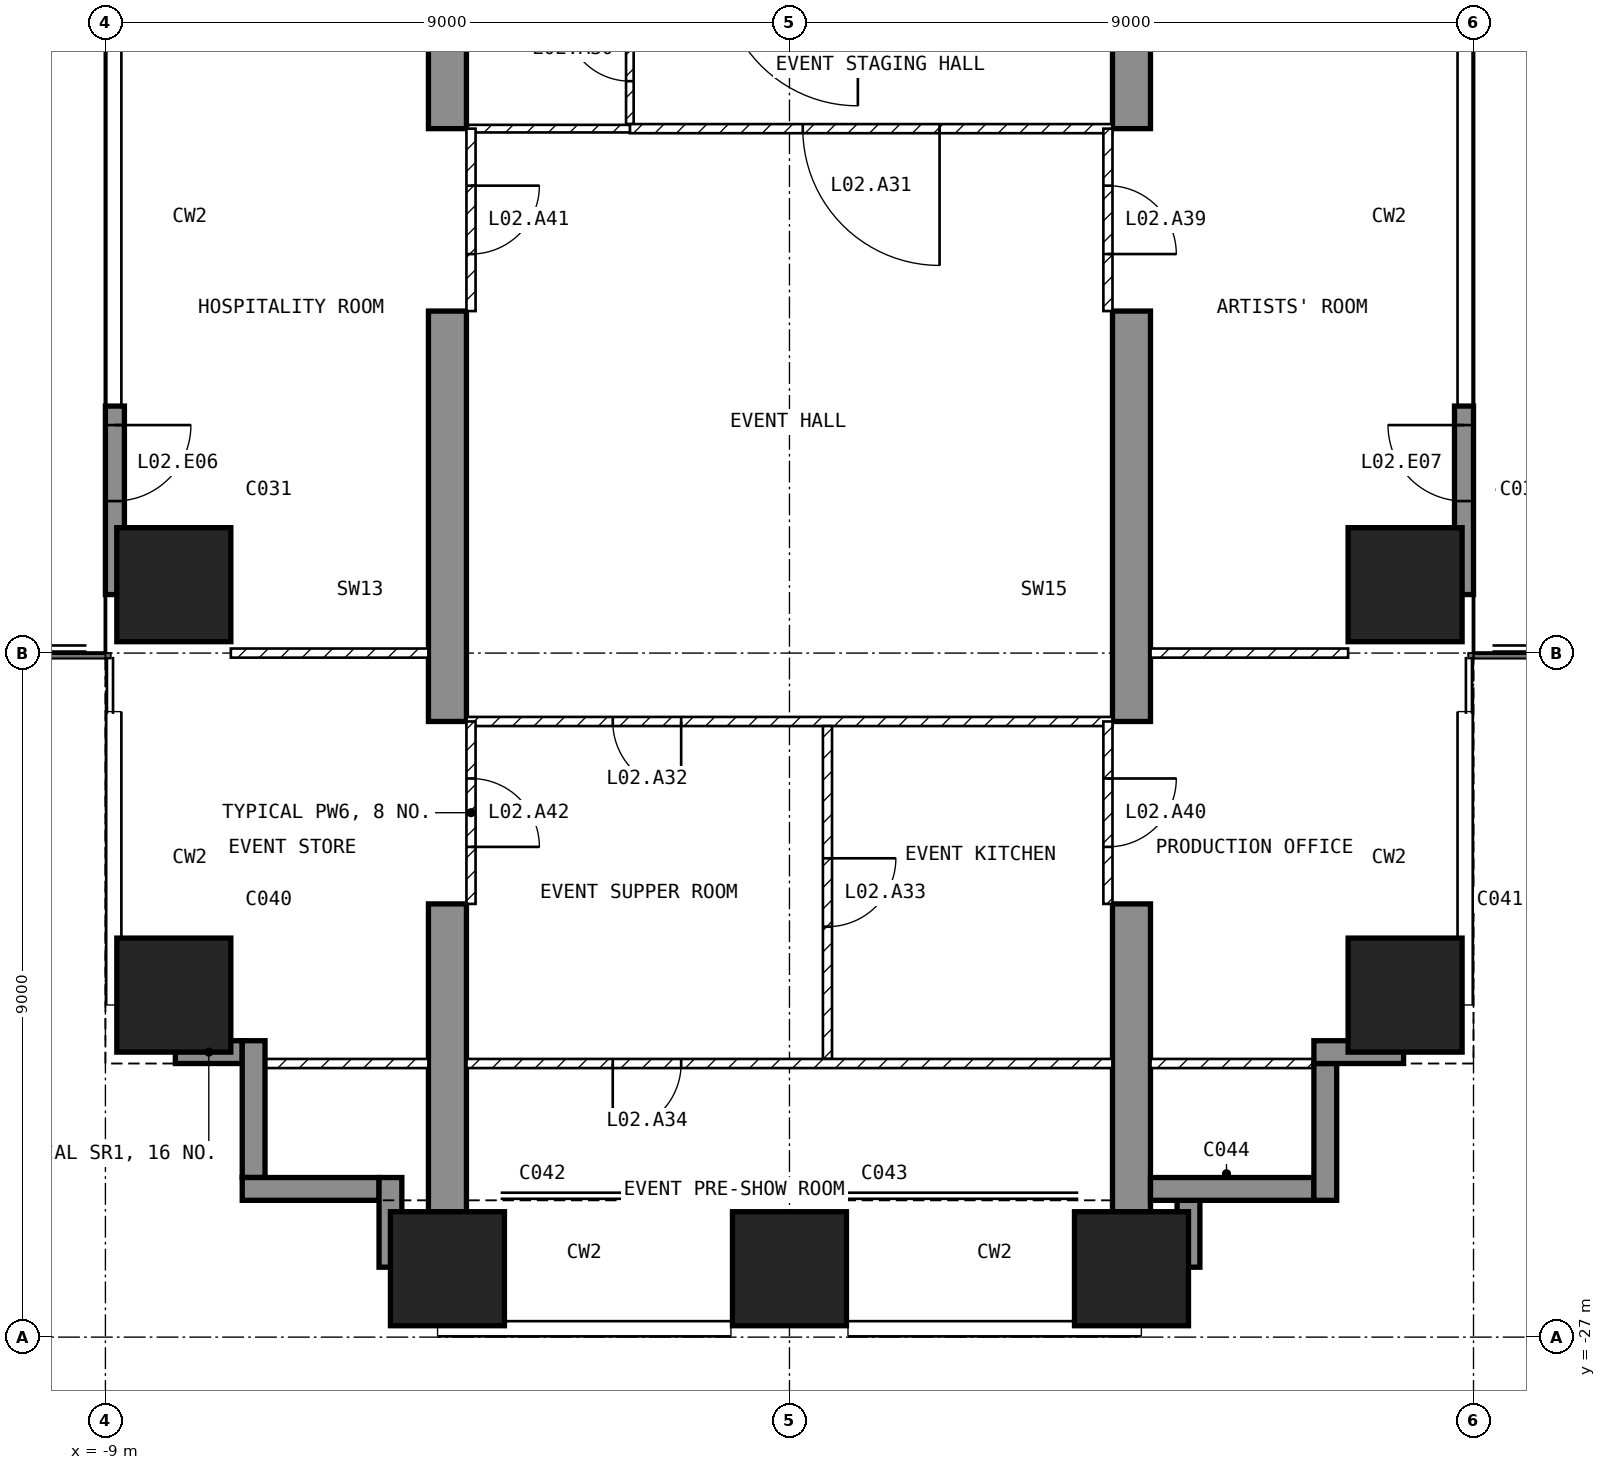
"""IFC4 building model, lengths in metres.
Left out: names, types, materials, properties, quantities, classifications, styles, units other than length and angle.
Written with IfcOpenShell. Run it as: python <this file> out.ifc"""

import sys

from ifc_helpers import new_model, si_unit, direction, frame, frame_2d, origin, origin_2d, place, context, subcontext, project, spatial, polyline, rectangle, outline, extrude, element, fill, save


model = new_model("IFC4")
c1 = context("Model", 3, precision=1e-05, world=origin(), true_north=direction((0.0, 1.0)))
c2 = subcontext(c1, "Body", "Model", "MODEL_VIEW")
j1 = project(units=[si_unit("LENGTHUNIT", "METRE"), si_unit("PLANEANGLEUNIT", "RADIAN")], contexts=[c1])
p1 = place(None, origin())
s1 = spatial("IfcSite", under=j1, at=p1, CompositionType="ELEMENT")
p2 = place(p1, origin())
s2 = spatial("IfcBuilding", under=s1, at=p2, CompositionType="ELEMENT")
p3 = place(p2, frame((0.0, 0.0, 21.0)))
s3 = spatial("IfcBuildingStorey", under=s2, at=p3, CompositionType="ELEMENT", Elevation=21.0)
for number, where, z_axis, x_axis in (
    (1, (-8.1, -22.5, -1.4), (0.0, 0.0, 1.0), (1.0, 0.0, 0.0)),
    (2, (-8.1, -17.1, -1.4), (0.0, 0.0, 1.0), (1.0, 0.0, 0.0)),
):
    element("IfcColumn", number, at=place(p3, frame(where, z_axis=z_axis, x_axis=x_axis)), inside=s3, PredefinedType="COLUMN", context=c2, shape_type="SweptSolid", body=[
        extrude(rectangle(XDim=1.5, YDim=1.5, at=origin_2d()), origin(), (0.0, 0.0, 1.0), 6.95),
    ])
for number, where, z_axis, x_axis in (
    (3, (-4.5, -26.1, -0.3), (0.0, 0.0, 1.0), (1.0, 0.0, 0.0)),
    (4, (0.0, -26.1, -0.3), (0.0, 0.0, 1.0), (1.0, 0.0, 0.0)),
    (5, (4.5, -26.1, -0.3), (0.0, 0.0, 1.0), (1.0, 0.0, 0.0)),
):
    element("IfcColumn", number, at=place(p3, frame(where, z_axis=z_axis, x_axis=x_axis)), inside=s3, PredefinedType="COLUMN", context=c2, shape_type="SweptSolid", body=[
        extrude(rectangle(XDim=1.5, YDim=1.5, at=origin_2d()), origin(), (0.0, 0.0, 1.0), 5.85),
    ])
for number, where, z_axis, x_axis in (
    (6, (8.1, -22.5, -1.4), (0.0, 0.0, 1.0), (1.0, 0.0, 0.0)),
    (7, (8.1, -17.1, -1.4), (0.0, 0.0, 1.0), (1.0, 0.0, 0.0)),
):
    element("IfcColumn", number, at=place(p3, frame(where, z_axis=z_axis, x_axis=x_axis)), inside=s3, PredefinedType="COLUMN", context=c2, shape_type="SweptSolid", body=[
        extrude(rectangle(XDim=1.5, YDim=1.5, at=origin_2d()), origin(), (0.0, 0.0, 1.0), 6.95),
    ])
for number, where, z_axis, x_axis in (
    (8, (-4.75, -25.35, -0.3), (1.0, 0.0, 0.0), (0.0, 1.0, 0.0)),
    (9, (4.25, -25.35, -0.3), (1.0, 0.0, 0.0), (0.0, 1.0, 0.0)),
):
    element("IfcWall", number, at=place(p3, frame(where, z_axis=z_axis, x_axis=x_axis)), inside=s3, PredefinedType="SHEAR", context=c2, shape_type="SweptSolid", body=[
        extrude(outline(polyline([(0.0, 0.0), (4.05, 0.0), (4.05, 2.7), (6.45, 2.7), (6.45, 0.0), (11.85, 0.0), (11.85, 2.7), (14.25, 2.7), (14.25, 0.0), (16.35, 0.0), (16.35, 5.85), (0.0, 5.85), (0.0, 0.0)])), origin(), (0.0, 0.0, 1.0), 0.5),
    ])
p4 = place(p3, frame((-8.875, -14.75, 0.0), z_axis=(0.0, 0.0, 1.0), x_axis=(0.0, -1.0, 0.0)))
e10 = element("IfcWall", 10, at=p4, inside=s3, PredefinedType="SOLIDWALL", context=c2, shape_type="SweptSolid", body=[
    extrude(rectangle(XDim=2.48, YDim=0.25, at=frame_2d((1.24, 0.0))), origin(), (0.0, 0.0, 1.0), 5.55),
])
p5 = place(p4, frame((0.25, 0.0, 0.0)))
e11 = element("IfcOpeningElement", 11, at=p5, cuts=e10, PredefinedType="OPENING", context=c2, shape_type="SweptSolid", body=[
    extrude(rectangle(XDim=1.0, YDim=2.4, at=frame_2d((0.5, 1.2))), frame((0.0, 0.135, 0.0), z_axis=(0.0, -1.0, 0.0), x_axis=(1.0, 0.0, 0.0)), (0.0, 0.0, 1.0), 0.27),
])
p6 = place(p3, frame((8.875, -17.23, 0.0), z_axis=(0.0, 0.0, 1.0), x_axis=(0.0, 1.0, 0.0)))
e12 = element("IfcWall", 12, at=p6, inside=s3, PredefinedType="SOLIDWALL", context=c2, shape_type="SweptSolid", body=[
    extrude(rectangle(XDim=2.48, YDim=0.25, at=frame_2d((1.24, 0.0))), origin(), (0.0, 0.0, 1.0), 5.55),
])
p7 = place(p6, frame((1.23, 0.0, 0.0)))
e13 = element("IfcOpeningElement", 13, at=p7, cuts=e12, PredefinedType="OPENING", context=c2, shape_type="SweptSolid", body=[
    extrude(rectangle(XDim=1.0, YDim=2.4, at=frame_2d((0.5, 1.2))), frame((0.0, 0.135, 0.0), z_axis=(0.0, -1.0, 0.0), x_axis=(1.0, 0.0, 0.0)), (0.0, 0.0, 1.0), 0.27),
])
p8 = place(p3, frame((5.25, -26.08, 0.0), z_axis=(0.0, 0.0, 1.0), x_axis=(0.0, 1.0, 0.0)))
e14 = element("IfcWall", 14, at=p8, inside=s3, PredefinedType="SOLIDWALL", context=c2, shape_type="SweptSolid", body=[
    extrude(rectangle(XDim=0.88, YDim=0.3, at=frame_2d((0.44, 0.0))), origin(), (0.0, 0.0, 1.0), 5.55),
])
p9 = place(p3, frame((4.75, -25.05, 0.0), z_axis=(0.0, 0.0, 1.0), x_axis=(1.0, 0.0, 0.0)))
e15 = element("IfcWall", 15, at=p9, inside=s3, PredefinedType="SOLIDWALL", context=c2, shape_type="SweptSolid", body=[
    extrude(rectangle(XDim=2.15, YDim=0.3, at=frame_2d((1.075, 0.0))), origin(), (0.0, 0.0, 1.0), 5.55),
])
p10 = place(p3, frame((7.05, -25.2, 0.0), z_axis=(0.0, 0.0, 1.0), x_axis=(0.0, 1.0, 0.0)))
e16 = element("IfcWall", 16, at=p10, inside=s3, PredefinedType="SOLIDWALL", context=c2, shape_type="SweptSolid", body=[
    extrude(rectangle(XDim=1.8, YDim=0.3, at=frame_2d((0.9, 0.0))), origin(), (0.0, 0.0, 1.0), 5.55),
])
p11 = place(p3, frame((6.9, -23.25, 0.0), z_axis=(0.0, 0.0, 1.0), x_axis=(1.0, 0.0, 0.0)))
e17 = element("IfcWall", 17, at=p11, inside=s3, PredefinedType="SOLIDWALL", context=c2, shape_type="SweptSolid", body=[
    extrude(rectangle(XDim=1.18, YDim=0.3, at=frame_2d((0.59, 0.0))), origin(), (0.0, 0.0, 1.0), 5.55),
])
p12 = place(p3, frame((-8.08, -23.25, 0.0), z_axis=(0.0, 0.0, 1.0), x_axis=(1.0, 0.0, 0.0)))
e18 = element("IfcWall", 18, at=p12, inside=s3, PredefinedType="SOLIDWALL", context=c2, shape_type="SweptSolid", body=[
    extrude(rectangle(XDim=0.88, YDim=0.3, at=frame_2d((0.44, 0.0))), origin(), (0.0, 0.0, 1.0), 5.55),
])
p13 = place(p3, frame((-7.05, -23.1, 0.0), z_axis=(0.0, 0.0, 1.0), x_axis=(0.0, -1.0, 0.0)))
e19 = element("IfcWall", 19, at=p13, inside=s3, PredefinedType="SOLIDWALL", context=c2, shape_type="SweptSolid", body=[
    extrude(rectangle(XDim=1.8, YDim=0.3, at=frame_2d((0.9, 0.0))), origin(), (0.0, 0.0, 1.0), 5.55),
])
p14 = place(p3, frame((-7.2, -25.05, 0.0), z_axis=(0.0, 0.0, 1.0), x_axis=(1.0, 0.0, 0.0)))
e20 = element("IfcWall", 20, at=p14, inside=s3, PredefinedType="SOLIDWALL", context=c2, shape_type="SweptSolid", body=[
    extrude(rectangle(XDim=1.8, YDim=0.3, at=frame_2d((0.9, 0.0))), origin(), (0.0, 0.0, 1.0), 5.55),
])
p15 = place(p3, frame((-5.25, -24.9, 0.0), z_axis=(0.0, 0.0, 1.0), x_axis=(0.0, -1.0, 0.0)))
e21 = element("IfcWall", 21, at=p15, inside=s3, PredefinedType="SOLIDWALL", context=c2, shape_type="SweptSolid", body=[
    extrude(rectangle(XDim=1.18, YDim=0.3, at=frame_2d((0.59, 0.0))), origin(), (0.0, 0.0, 1.0), 5.55),
])
p16 = place(p3, frame((-2.1, -11.04, 0.0), z_axis=(0.0, 0.0, 1.0), x_axis=(0.0, 1.0, 0.0)))
e22 = element("IfcWall", 22, at=p16, inside=s3, PredefinedType="PARTITIONING", context=c2, shape_type="SweptSolid", body=[
    extrude(rectangle(XDim=1.98, YDim=0.1, at=frame_2d((0.99, 0.0))), origin(), (0.0, 0.0, 1.0), 5.55),
])
p17 = place(p16, frame((0.565, 0.0, 0.0)))
e23 = element("IfcOpeningElement", 23, at=p17, cuts=e22, PredefinedType="OPENING", context=c2, shape_type="SweptSolid", body=[
    extrude(rectangle(XDim=0.85, YDim=2.1, at=frame_2d((0.425, 1.05))), frame((0.0, 0.06, 0.0), z_axis=(0.0, -1.0, 0.0), x_axis=(1.0, 0.0, 0.0)), (0.0, 0.0, 1.0), 0.12),
])
p18 = place(p3, frame((4.25, -11.1, 0.0), z_axis=(0.0, 0.0, 1.0), x_axis=(-1.0, 0.0, 0.0)))
e24 = element("IfcWall", 24, at=p18, inside=s3, PredefinedType="PARTITIONING", context=c2, shape_type="SweptSolid", body=[
    extrude(rectangle(XDim=6.35, YDim=0.12, at=frame_2d((3.175, 0.0))), origin(), (0.0, 0.0, 1.0), 5.55),
])
p19 = place(p18, frame((2.275, 0.0, 0.0)))
e25 = element("IfcOpeningElement", 25, at=p19, cuts=e24, PredefinedType="OPENING", context=c2, shape_type="SweptSolid", body=[
    extrude(rectangle(XDim=1.8, YDim=2.1, at=frame_2d((0.9, 1.05))), frame((0.0, 0.07, 0.0), z_axis=(0.0, -1.0, 0.0), x_axis=(1.0, 0.0, 0.0)), (0.0, 0.0, 1.0), 0.14),
])
p20 = place(p3, frame((-2.1, -11.1, 0.0), z_axis=(0.0, 0.0, 1.0), x_axis=(-1.0, 0.0, 0.0)))
e26 = element("IfcWall", 26, at=p20, inside=s3, PredefinedType="PARTITIONING", context=c2, shape_type="SweptSolid", body=[
    extrude(rectangle(XDim=2.15, YDim=0.1, at=frame_2d((1.075, 0.0))), origin(), (0.0, 0.0, 1.0), 5.55),
])
p21 = place(p3, frame((4.25, -18.9, 0.0), z_axis=(0.0, 0.0, 1.0), x_axis=(-1.0, 0.0, 0.0)))
e27 = element("IfcWall", 27, at=p21, inside=s3, PredefinedType="PARTITIONING", context=c2, shape_type="SweptSolid", body=[
    extrude(rectangle(XDim=8.5, YDim=0.12, at=frame_2d((4.25, 0.0))), origin(), (0.0, 0.0, 1.0), 5.55),
])
p22 = place(p21, frame((5.675, 0.0, 0.0)))
e28 = element("IfcOpeningElement", 28, at=p22, cuts=e27, PredefinedType="OPENING", context=c2, shape_type="SweptSolid", body=[
    extrude(rectangle(XDim=0.9, YDim=2.1, at=frame_2d((0.45, 1.05))), frame((0.0, 0.07, 0.0), z_axis=(0.0, -1.0, 0.0), x_axis=(1.0, 0.0, 0.0)), (0.0, 0.0, 1.0), 0.14),
])
p23 = place(p3, frame((0.5, -18.96, 0.0), z_axis=(0.0, 0.0, 1.0), x_axis=(0.0, -1.0, 0.0)))
e29 = element("IfcWall", 29, at=p23, inside=s3, PredefinedType="PARTITIONING", context=c2, shape_type="SweptSolid", body=[
    extrude(rectangle(XDim=4.38, YDim=0.12, at=frame_2d((2.19, 0.0))), origin(), (0.0, 0.0, 1.0), 5.55),
])
p24 = place(p23, frame((1.74, 0.0, 0.0)))
e30 = element("IfcOpeningElement", 30, at=p24, cuts=e29, PredefinedType="OPENING", context=c2, shape_type="SweptSolid", body=[
    extrude(rectangle(XDim=0.9, YDim=2.1, at=frame_2d((0.45, 1.05))), frame((0.0, 0.07, 0.0), z_axis=(0.0, -1.0, 0.0), x_axis=(1.0, 0.0, 0.0)), (0.0, 0.0, 1.0), 0.14),
])
p25 = place(p3, frame((4.25, -23.4, 0.0), z_axis=(0.0, 0.0, 1.0), x_axis=(-1.0, 0.0, 0.0)))
e31 = element("IfcWall", 31, at=p25, inside=s3, PredefinedType="PARTITIONING", context=c2, shape_type="SweptSolid", body=[
    extrude(rectangle(XDim=8.5, YDim=0.12, at=frame_2d((4.25, 0.0))), origin(), (0.0, 0.0, 1.0), 5.55),
])
p26 = place(p25, frame((5.675, 0.0, 0.0)))
e32 = element("IfcOpeningElement", 32, at=p26, cuts=e31, PredefinedType="OPENING", context=c2, shape_type="SweptSolid", body=[
    extrude(rectangle(XDim=0.9, YDim=2.1, at=frame_2d((0.45, 1.05))), frame((0.0, 0.07, 0.0), z_axis=(0.0, -1.0, 0.0), x_axis=(1.0, 0.0, 0.0)), (0.0, 0.0, 1.0), 0.14),
])
p27 = place(p3, frame((7.35, -18.0, 0.0), z_axis=(0.0, 0.0, 1.0), x_axis=(-1.0, 0.0, 0.0)))
e33 = element("IfcWall", 33, at=p27, inside=s3, PredefinedType="PARTITIONING", context=c2, shape_type="SweptSolid", body=[
    extrude(rectangle(XDim=2.6, YDim=0.12, at=frame_2d((1.3, 0.0))), origin(), (0.0, 0.0, 1.0), 5.55),
])
p28 = place(p3, frame((7.12, -23.4, 0.0), z_axis=(0.0, 0.0, 1.0), x_axis=(-1.0, 0.0, 0.0)))
e34 = element("IfcWall", 34, at=p28, inside=s3, PredefinedType="PARTITIONING", context=c2, shape_type="SweptSolid", body=[
    extrude(rectangle(XDim=2.37, YDim=0.12, at=frame_2d((1.185, 0.0))), origin(), (0.0, 0.0, 1.0), 5.55),
])
p29 = place(p3, frame((-4.75, -18.0, 0.0), z_axis=(0.0, 0.0, 1.0), x_axis=(-1.0, 0.0, 0.0)))
e35 = element("IfcWall", 35, at=p29, inside=s3, PredefinedType="PARTITIONING", context=c2, shape_type="SweptSolid", body=[
    extrude(rectangle(XDim=2.6, YDim=0.12, at=frame_2d((1.3, 0.0))), origin(), (0.0, 0.0, 1.0), 5.55),
])
p30 = place(p3, frame((-4.75, -23.4, 0.0), z_axis=(0.0, 0.0, 1.0), x_axis=(-1.0, 0.0, 0.0)))
e36 = element("IfcWall", 36, at=p30, inside=s3, PredefinedType="PARTITIONING", context=c2, shape_type="SweptSolid", body=[
    extrude(rectangle(XDim=2.37, YDim=0.12, at=frame_2d((1.185, 0.0))), origin(), (0.0, 0.0, 1.0), 5.55),
])
p31 = place(p3, frame((4.19, -11.1, 0.0), z_axis=(0.0, 0.0, 1.0), x_axis=(0.0, -1.0, 0.0)))
e37 = element("IfcWall", 37, at=p31, inside=s3, PredefinedType="PARTITIONING", context=c2, shape_type="SweptSolid", body=[
    extrude(rectangle(XDim=2.4, YDim=0.12, at=frame_2d((1.2, 0.0))), origin(), (0.0, 0.0, 1.0), 2.4),
])
p32 = place(p31, frame((0.75, 0.0, 0.0)))
e38 = element("IfcOpeningElement", 38, at=p32, cuts=e37, PredefinedType="OPENING", context=c2, shape_type="SweptSolid", body=[
    extrude(rectangle(XDim=0.9, YDim=2.1, at=frame_2d((0.45, 1.05))), frame((0.0, 0.07, 0.0), z_axis=(0.0, -1.0, 0.0), x_axis=(1.0, 0.0, 0.0)), (0.0, 0.0, 1.0), 0.14),
])
p33 = place(p3, frame((4.19, -18.9, 0.0), z_axis=(0.0, 0.0, 1.0), x_axis=(0.0, -1.0, 0.0)))
e39 = element("IfcWall", 39, at=p33, inside=s3, PredefinedType="PARTITIONING", context=c2, shape_type="SweptSolid", body=[
    extrude(rectangle(XDim=2.4, YDim=0.12, at=frame_2d((1.2, 0.0))), origin(), (0.0, 0.0, 1.0), 2.4),
])
p34 = place(p33, frame((0.75, 0.0, 0.0)))
e40 = element("IfcOpeningElement", 40, at=p34, cuts=e39, PredefinedType="OPENING", context=c2, shape_type="SweptSolid", body=[
    extrude(rectangle(XDim=0.9, YDim=2.1, at=frame_2d((0.45, 1.05))), frame((0.0, 0.07, 0.0), z_axis=(0.0, -1.0, 0.0), x_axis=(1.0, 0.0, 0.0)), (0.0, 0.0, 1.0), 0.14),
])
p35 = place(p3, frame((-4.19, -11.1, 0.0), z_axis=(0.0, 0.0, 1.0), x_axis=(0.0, -1.0, 0.0)))
e41 = element("IfcWall", 41, at=p35, inside=s3, PredefinedType="PARTITIONING", context=c2, shape_type="SweptSolid", body=[
    extrude(rectangle(XDim=2.4, YDim=0.12, at=frame_2d((1.2, 0.0))), origin(), (0.0, 0.0, 1.0), 2.4),
])
p36 = place(p35, frame((0.75, 0.0, 0.0)))
e42 = element("IfcOpeningElement", 42, at=p36, cuts=e41, PredefinedType="OPENING", context=c2, shape_type="SweptSolid", body=[
    extrude(rectangle(XDim=0.9, YDim=2.1, at=frame_2d((0.45, 1.05))), frame((0.0, 0.07, 0.0), z_axis=(0.0, -1.0, 0.0), x_axis=(1.0, 0.0, 0.0)), (0.0, 0.0, 1.0), 0.14),
])
p37 = place(p3, frame((-4.19, -18.9, 0.0), z_axis=(0.0, 0.0, 1.0), x_axis=(0.0, -1.0, 0.0)))
e43 = element("IfcWall", 43, at=p37, inside=s3, PredefinedType="PARTITIONING", context=c2, shape_type="SweptSolid", body=[
    extrude(rectangle(XDim=2.4, YDim=0.12, at=frame_2d((1.2, 0.0))), origin(), (0.0, 0.0, 1.0), 2.4),
])
p38 = place(p37, frame((0.75, 0.0, 0.0)))
e44 = element("IfcOpeningElement", 44, at=p38, cuts=e43, PredefinedType="OPENING", context=c2, shape_type="SweptSolid", body=[
    extrude(rectangle(XDim=0.9, YDim=2.1, at=frame_2d((0.45, 1.05))), frame((0.0, 0.07, 0.0), z_axis=(0.0, -1.0, 0.0), x_axis=(1.0, 0.0, 0.0)), (0.0, 0.0, 1.0), 0.14),
])
p39 = place(p5, origin())
e45 = element("IfcDoor", 45, at=p39, inside=s3, OperationType="SINGLE_SWING_LEFT", PredefinedType="DOOR", context=c2, shape_type="SweptSolid", body=[
    extrude(rectangle(XDim=1.0, YDim=2.4, at=frame_2d((0.5, 1.2))), frame((0.0, 0.025, 0.0), z_axis=(0.0, -1.0, 0.0), x_axis=(1.0, 0.0, 0.0)), (0.0, 0.0, 1.0), 0.05),
])
fill(e11, e45)
p40 = place(p7, origin())
e46 = element("IfcDoor", 46, at=p40, inside=s3, OperationType="SINGLE_SWING_RIGHT", PredefinedType="DOOR", context=c2, shape_type="SweptSolid", body=[
    extrude(rectangle(XDim=1.0, YDim=2.4, at=frame_2d((0.5, 1.2))), frame((0.0, 0.025, 0.0), z_axis=(0.0, -1.0, 0.0), x_axis=(1.0, 0.0, 0.0)), (0.0, 0.0, 1.0), 0.05),
])
fill(e13, e46)
p41 = place(p17, origin())
e47 = element("IfcDoor", 47, at=p41, inside=s3, OperationType="SINGLE_SWING_RIGHT", PredefinedType="DOOR", context=c2, shape_type="SweptSolid", body=[
    extrude(rectangle(XDim=0.85, YDim=2.1, at=frame_2d((0.425, 1.05))), frame((0.0, 0.025, 0.0), z_axis=(0.0, -1.0, 0.0), x_axis=(1.0, 0.0, 0.0)), (0.0, 0.0, 1.0), 0.05),
])
fill(e23, e47)
p42 = place(p19, origin())
e48 = element("IfcDoor", 48, at=p42, inside=s3, OperationType="SINGLE_SWING_LEFT", PredefinedType="DOOR", context=c2, shape_type="SweptSolid", body=[
    extrude(rectangle(XDim=1.8, YDim=2.1, at=frame_2d((0.9, 1.05))), frame((0.0, 0.025, 0.0), z_axis=(0.0, -1.0, 0.0), x_axis=(1.0, 0.0, 0.0)), (0.0, 0.0, 1.0), 0.05),
])
fill(e25, e48)
p43 = place(p22, origin())
e49 = element("IfcDoor", 49, at=p43, inside=s3, OperationType="SINGLE_SWING_LEFT", PredefinedType="DOOR", context=c2, shape_type="SweptSolid", body=[
    extrude(rectangle(XDim=0.9, YDim=2.1, at=frame_2d((0.45, 1.05))), frame((0.0, 0.025, 0.0), z_axis=(0.0, -1.0, 0.0), x_axis=(1.0, 0.0, 0.0)), (0.0, 0.0, 1.0), 0.05),
])
fill(e28, e49)
p44 = place(p24, origin())
e50 = element("IfcDoor", 50, at=p44, inside=s3, OperationType="SINGLE_SWING_LEFT", PredefinedType="DOOR", context=c2, shape_type="SweptSolid", body=[
    extrude(rectangle(XDim=0.9, YDim=2.1, at=frame_2d((0.45, 1.05))), frame((0.0, 0.025, 0.0), z_axis=(0.0, -1.0, 0.0), x_axis=(1.0, 0.0, 0.0)), (0.0, 0.0, 1.0), 0.05),
])
fill(e30, e50)
p45 = place(p26, origin())
e51 = element("IfcDoor", 51, at=p45, inside=s3, OperationType="SINGLE_SWING_RIGHT", PredefinedType="DOOR", context=c2, shape_type="SweptSolid", body=[
    extrude(rectangle(XDim=0.9, YDim=2.1, at=frame_2d((0.45, 1.05))), frame((0.0, 0.025, 0.0), z_axis=(0.0, -1.0, 0.0), x_axis=(1.0, 0.0, 0.0)), (0.0, 0.0, 1.0), 0.05),
])
fill(e32, e51)
p46 = place(p32, origin())
e52 = element("IfcDoor", 52, at=p46, inside=s3, OperationType="SINGLE_SWING_RIGHT", PredefinedType="DOOR", context=c2, shape_type="SweptSolid", body=[
    extrude(rectangle(XDim=0.9, YDim=2.1, at=frame_2d((0.45, 1.05))), frame((0.0, 0.025, 0.0), z_axis=(0.0, -1.0, 0.0), x_axis=(1.0, 0.0, 0.0)), (0.0, 0.0, 1.0), 0.05),
])
fill(e38, e52)
p47 = place(p34, origin())
e53 = element("IfcDoor", 53, at=p47, inside=s3, OperationType="SINGLE_SWING_LEFT", PredefinedType="DOOR", context=c2, shape_type="SweptSolid", body=[
    extrude(rectangle(XDim=0.9, YDim=2.1, at=frame_2d((0.45, 1.05))), frame((0.0, 0.025, 0.0), z_axis=(0.0, -1.0, 0.0), x_axis=(1.0, 0.0, 0.0)), (0.0, 0.0, 1.0), 0.05),
])
fill(e40, e53)
p48 = place(p36, origin())
e54 = element("IfcDoor", 54, at=p48, inside=s3, OperationType="SINGLE_SWING_LEFT", PredefinedType="DOOR", context=c2, shape_type="SweptSolid", body=[
    extrude(rectangle(XDim=0.9, YDim=2.1, at=frame_2d((0.45, 1.05))), frame((0.0, 0.025, 0.0), z_axis=(0.0, -1.0, 0.0), x_axis=(1.0, 0.0, 0.0)), (0.0, 0.0, 1.0), 0.05),
])
fill(e42, e54)
p49 = place(p38, origin())
e55 = element("IfcDoor", 55, at=p49, inside=s3, OperationType="SINGLE_SWING_RIGHT", PredefinedType="DOOR", context=c2, shape_type="SweptSolid", body=[
    extrude(rectangle(XDim=0.9, YDim=2.1, at=frame_2d((0.45, 1.05))), frame((0.0, 0.025, 0.0), z_axis=(0.0, -1.0, 0.0), x_axis=(1.0, 0.0, 0.0)), (0.0, 0.0, 1.0), 0.05),
])
fill(e44, e55)
save(model, sys.argv[1])
